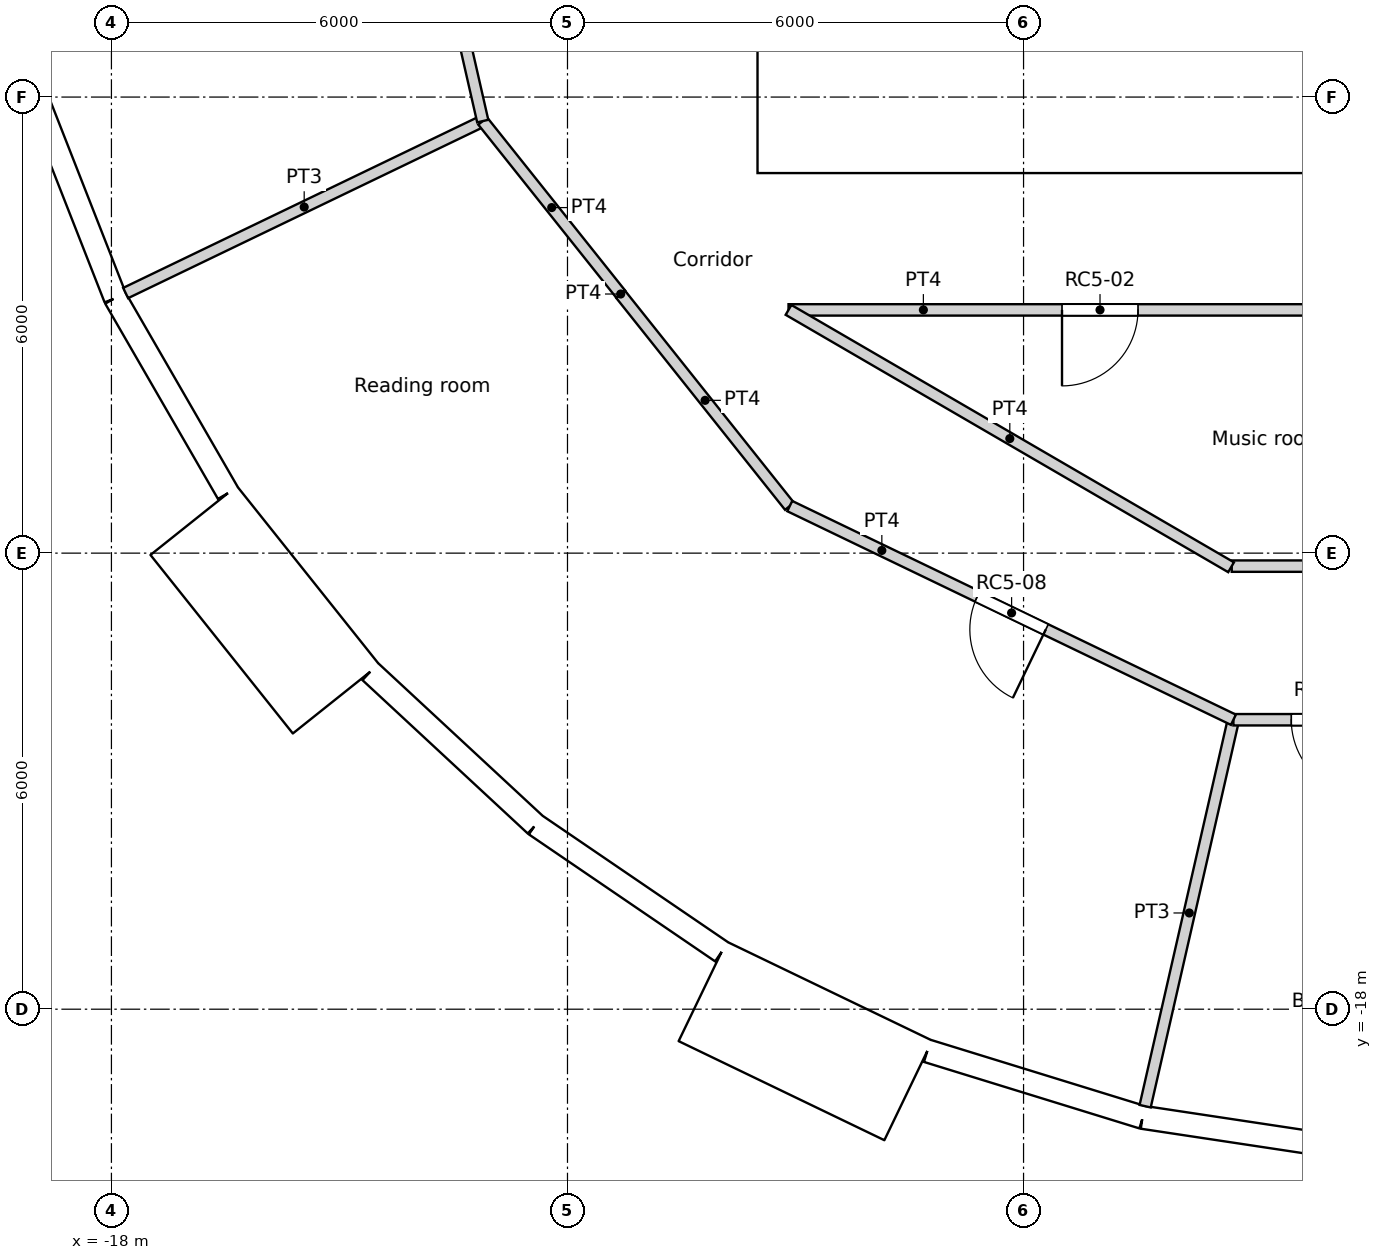
"""IFC4 building model, lengths in metres.
Left out: names, types, materials, properties, quantities, classifications, styles, units other than length and angle.
Written with IfcOpenShell. Run it as: python <this file> out.ifc"""

import sys

from ifc_helpers import new_model, si_unit, direction, frame, frame_2d, origin, origin_2d, place, context, subcontext, project, spatial, rectangle, circle, extrude, element, fill, save


model = new_model("IFC4")
c1 = context("Model", 3, precision=1e-05, world=origin(), true_north=direction((0.0, 1.0)))
c2 = subcontext(c1, "Body", "Model", "MODEL_VIEW")
j1 = project(units=[si_unit("LENGTHUNIT", "METRE"), si_unit("PLANEANGLEUNIT", "RADIAN")], contexts=[c1])
p1 = place(None, origin())
s1 = spatial("IfcSite", under=j1, at=p1, CompositionType="ELEMENT")
p2 = place(p1, origin())
s2 = spatial("IfcBuilding", under=s1, at=p2, CompositionType="ELEMENT")
p3 = place(p2, frame((0.0, 0.0, 270.6)))
s3 = spatial("IfcBuildingStorey", under=s2, at=p3, CompositionType="ELEMENT", Elevation=270.6)
for number, where, z_axis, x_axis in (
    (1, (-16.958, -8.167, 0.0), (0.0, 0.0, 1.0), (1.0, 0.0, 0.0)),
    (2, (-13.798, -12.802, 0.0), (0.0, 0.0, 1.0), (1.0, 0.0, 0.0)),
    (3, (-9.411, -16.301, 0.0), (0.0, 0.0, 1.0), (1.0, 0.0, 0.0)),
    (4, (-4.188, -18.35, 0.0), (0.0, 0.0, 1.0), (1.0, 0.0, 0.0)),
):
    element("IfcColumn", number, at=place(p3, frame(where, z_axis=z_axis, x_axis=x_axis)), inside=s3, PredefinedType="COLUMN", context=c2, shape_type="SweptSolid", body=[
        extrude(circle(Radius=0.55, at=origin_2d()), origin(), (0.0, 0.0, 1.0), 3.6),
    ])
p4 = place(p3, frame((-19.031, -5.886, 0.0), z_axis=(0.0, 0.0, 1.0), x_axis=(0.365343821297, -0.930872650925, 0.0)))
e5 = element("IfcWall", 5, at=p4, inside=s3, PredefinedType="SOLIDWALL", context=c2, shape_type="SweptSolid", body=[
    extrude(rectangle(XDim=2.962, YDim=0.3, at=frame_2d((1.481, 0.0))), origin(), (0.0, 0.0, 1.0), 3.25),
])
p5 = place(p4, frame((1.481, 0.0, 1.55)))
e6 = element("IfcOpeningElement", 6, at=p5, cuts=e5, PredefinedType="OPENING", context=c2, shape_type="SweptSolid", body=[
    extrude(circle(Radius=0.9, at=origin_2d()), frame((0.0, 0.16, 0.0), z_axis=(0.0, -1.0, 0.0), x_axis=(1.0, 0.0, 0.0)), (0.0, 0.0, 1.0), 0.32),
])
p6 = place(p3, frame((-17.949, -8.644, 0.0), z_axis=(0.0, 0.0, 1.0), x_axis=(0.500012570604, -0.866018146021, 0.0)))
e7 = element("IfcWall", 7, at=p6, inside=s3, PredefinedType="SOLIDWALL", context=c2, shape_type="SweptSolid", body=[
    extrude(rectangle(XDim=2.962, YDim=0.3, at=frame_2d((1.481, 0.0))), origin(), (0.0, 0.0, 1.0), 3.25),
])
p7 = place(p6, frame((1.481, 0.0, 1.55)))
e8 = element("IfcOpeningElement", 8, at=p7, cuts=e7, PredefinedType="OPENING", context=c2, shape_type="SweptSolid", body=[
    extrude(circle(Radius=0.9, at=origin_2d()), frame((0.0, 0.16, 0.0), z_axis=(0.0, -1.0, 0.0), x_axis=(1.0, 0.0, 0.0)), (0.0, 0.0, 1.0), 0.32),
])
p8 = place(p3, frame((-16.917, -11.572, -0.35), z_axis=(0.0, 0.0, 1.0), x_axis=(0.623523286312, -0.781804778335, 0.0)))
e9 = element("IfcWall", 9, at=p8, inside=s3, PredefinedType="ELEMENTEDWALL", context=c2, shape_type="SweptSolid", body=[
    extrude(rectangle(XDim=3.0, YDim=1.45, at=frame_2d((1.5, 0.0))), origin(), (0.0, 0.0, 1.0), 3.6),
])
p9 = place(p8, frame((1.5, 0.0, 1.9)))
e10 = element("IfcOpeningElement", 10, at=p9, cuts=e9, PredefinedType="OPENING", context=c2, shape_type="SweptSolid", body=[
    extrude(circle(Radius=0.9, at=origin_2d()), frame((0.0, 0.735, 0.0), z_axis=(0.0, -1.0, 0.0), x_axis=(1.0, 0.0, 0.0)), (0.0, 0.0, 1.0), 1.47),
])
p10 = place(p3, frame((-14.593, -13.561, 0.0), z_axis=(0.0, 0.0, 1.0), x_axis=(0.733028283666, -0.680198158882, 0.0)))
e11 = element("IfcWall", 11, at=p10, inside=s3, PredefinedType="SOLIDWALL", context=c2, shape_type="SweptSolid", body=[
    extrude(rectangle(XDim=2.962, YDim=0.3, at=frame_2d((1.481, 0.0))), origin(), (0.0, 0.0, 1.0), 3.25),
])
p11 = place(p10, frame((1.481, 0.0, 1.55)))
e12 = element("IfcOpeningElement", 12, at=p11, cuts=e11, PredefinedType="OPENING", context=c2, shape_type="SweptSolid", body=[
    extrude(circle(Radius=0.9, at=origin_2d()), frame((0.0, 0.16, 0.0), z_axis=(0.0, -1.0, 0.0), x_axis=(1.0, 0.0, 0.0)), (0.0, 0.0, 1.0), 0.32),
])
p12 = place(p3, frame((-12.421, -15.575, 0.0), z_axis=(0.0, 0.0, 1.0), x_axis=(0.826236061068, -0.563324037646, 0.0)))
e13 = element("IfcWall", 13, at=p12, inside=s3, PredefinedType="SOLIDWALL", context=c2, shape_type="SweptSolid", body=[
    extrude(rectangle(XDim=2.962, YDim=0.3, at=frame_2d((1.481, 0.0))), origin(), (0.0, 0.0, 1.0), 3.25),
])
p13 = place(p12, frame((1.481, 0.0, 1.55)))
e14 = element("IfcOpeningElement", 14, at=p13, cuts=e13, PredefinedType="OPENING", context=c2, shape_type="SweptSolid", body=[
    extrude(circle(Radius=0.9, at=origin_2d()), frame((0.0, 0.16, 0.0), z_axis=(0.0, -1.0, 0.0), x_axis=(1.0, 0.0, 0.0)), (0.0, 0.0, 1.0), 0.32),
])
p14 = place(p3, frame((-10.22, -17.766, -0.35), z_axis=(0.0, 0.0, 1.0), x_axis=(0.900953362039, -0.433915935904, 0.0)))
e15 = element("IfcWall", 15, at=p14, inside=s3, PredefinedType="ELEMENTEDWALL", context=c2, shape_type="SweptSolid", body=[
    extrude(rectangle(XDim=3.0, YDim=1.45, at=frame_2d((1.5, 0.0))), origin(), (0.0, 0.0, 1.0), 3.6),
])
p15 = place(p14, frame((1.5, 0.0, 1.9)))
e16 = element("IfcOpeningElement", 16, at=p15, cuts=e15, PredefinedType="OPENING", context=c2, shape_type="SweptSolid", body=[
    extrude(circle(Radius=0.9, at=origin_2d()), frame((0.0, 0.735, 0.0), z_axis=(0.0, -1.0, 0.0), x_axis=(1.0, 0.0, 0.0)), (0.0, 0.0, 1.0), 1.47),
])
p16 = place(p3, frame((-7.264, -18.549, 0.0), z_axis=(0.0, 0.0, 1.0), x_axis=(0.955555982805, -0.29480970765, 0.0)))
e17 = element("IfcWall", 17, at=p16, inside=s3, PredefinedType="SOLIDWALL", context=c2, shape_type="SweptSolid", body=[
    extrude(rectangle(XDim=2.962, YDim=0.3, at=frame_2d((1.481, 0.0))), origin(), (0.0, 0.0, 1.0), 3.25),
])
p17 = place(p16, frame((1.481, 0.0, 1.55)))
e18 = element("IfcOpeningElement", 18, at=p17, cuts=e17, PredefinedType="OPENING", context=c2, shape_type="SweptSolid", body=[
    extrude(circle(Radius=0.9, at=origin_2d()), frame((0.0, 0.16, 0.0), z_axis=(0.0, -1.0, 0.0), x_axis=(1.0, 0.0, 0.0)), (0.0, 0.0, 1.0), 0.32),
])
p18 = place(p3, frame((-4.433, -19.422, 0.0), z_axis=(0.0, 0.0, 1.0), x_axis=(0.988835775663, -0.149009425104, 0.0)))
e19 = element("IfcWall", 19, at=p18, inside=s3, PredefinedType="SOLIDWALL", context=c2, shape_type="SweptSolid", body=[
    extrude(rectangle(XDim=2.962, YDim=0.3, at=frame_2d((1.481, 0.0))), origin(), (0.0, 0.0, 1.0), 3.25),
])
p19 = place(p18, frame((1.481, 0.0, 1.55)))
e20 = element("IfcOpeningElement", 20, at=p19, cuts=e19, PredefinedType="OPENING", context=c2, shape_type="SweptSolid", body=[
    extrude(circle(Radius=0.9, at=origin_2d()), frame((0.0, 0.16, 0.0), z_axis=(0.0, -1.0, 0.0), x_axis=(1.0, 0.0, 0.0)), (0.0, 0.0, 1.0), 0.32),
])
p20 = place(p3, frame((-9.5, -6.7, 0.0), z_axis=(0.0, 0.0, 1.0), x_axis=(1.0, 0.0, 0.0)))
e21 = element("IfcWall", 21, at=p20, inside=s3, PredefinedType="SOLIDWALL", context=c2, shape_type="SweptSolid", body=[
    extrude(rectangle(XDim=19.0, YDim=0.6, at=frame_2d((9.5, 0.0))), origin(), (0.0, 0.0, 1.0), 3.6),
])
p21 = place(p20, frame((10.4, 0.0, 0.0)))
e22 = element("IfcOpeningElement", 22, at=p21, cuts=e21, PredefinedType="OPENING", context=c2, shape_type="SweptSolid", body=[
    extrude(rectangle(XDim=1.0, YDim=2.1, at=frame_2d((0.5, 1.05))), frame((0.0, 0.3, 0.0), z_axis=(0.0, -1.0, 0.0), x_axis=(1.0, 0.0, 0.0)), (0.0, 0.0, 1.0), 0.6),
])
p22 = place(p20, frame((5.35, 0.0, 0.0)))
e23 = element("IfcOpeningElement", 23, at=p22, cuts=e21, PredefinedType="OPENING", context=c2, shape_type="SweptSolid", body=[
    extrude(rectangle(XDim=1.7, YDim=2.1, at=frame_2d((0.85, 1.05))), frame((0.0, 0.3, 0.0), z_axis=(0.0, -1.0, 0.0), x_axis=(1.0, 0.0, 0.0)), (0.0, 0.0, 1.0), 0.6),
])
p23 = place(p20, frame((11.95, 0.0, 0.0)))
e24 = element("IfcOpeningElement", 24, at=p23, cuts=e21, PredefinedType="OPENING", context=c2, shape_type="SweptSolid", body=[
    extrude(rectangle(XDim=1.7, YDim=2.1, at=frame_2d((0.85, 1.05))), frame((0.0, 0.3, 0.0), z_axis=(0.0, -1.0, 0.0), x_axis=(1.0, 0.0, 0.0)), (0.0, 0.0, 1.0), 0.6),
])
p24 = place(p3, frame((-9.2, -6.4, 0.0), z_axis=(0.0, 0.0, 1.0), x_axis=(0.0, 1.0, 0.0)))
e25 = element("IfcWall", 25, at=p24, inside=s3, PredefinedType="SOLIDWALL", context=c2, shape_type="SweptSolid", body=[
    extrude(rectangle(XDim=12.8, YDim=0.6, at=frame_2d((6.4, 0.0))), origin(), (0.0, 0.0, 1.0), 3.6),
])
p25 = place(p3, frame((-2.25, -6.4, 0.0), z_axis=(0.0, 0.0, 1.0), x_axis=(0.0, 1.0, 0.0)))
e26 = element("IfcWall", 26, at=p25, inside=s3, PredefinedType="SOLIDWALL", context=c2, shape_type="SweptSolid", body=[
    extrude(rectangle(XDim=3.15, YDim=0.3, at=frame_2d((1.575, 0.0))), origin(), (0.0, 0.0, 1.0), 3.25),
])
p26 = place(p3, frame((-9.092, -8.8, 0.0), z_axis=(0.0, 0.0, 1.0), x_axis=(1.0, 0.0, 0.0)))
e27 = element("IfcWall", 27, at=p26, inside=s3, PredefinedType="PARTITIONING", context=c2, shape_type="SweptSolid", body=[
    extrude(rectangle(XDim=8.196, YDim=0.15, at=frame_2d((4.098, 0.0))), origin(), (0.0, 0.0, 1.0), 3.1),
])
p27 = place(p26, frame((3.598, 0.0, 0.0)))
e28 = element("IfcOpeningElement", 28, at=p27, cuts=e27, PredefinedType="OPENING", context=c2, shape_type="SweptSolid", body=[
    extrude(rectangle(XDim=1.0, YDim=2.04, at=frame_2d((0.5, 1.02))), frame((0.0, 0.075, 0.0), z_axis=(0.0, -1.0, 0.0), x_axis=(1.0, 0.0, 0.0)), (0.0, 0.0, 1.0), 0.15),
])
p28 = place(p3, frame((-9.092, -8.8, 0.0), z_axis=(0.0, 0.0, 1.0), x_axis=(0.864470922103, -0.502682827277, 0.0)))
e29 = element("IfcWall", 29, at=p28, inside=s3, PredefinedType="PARTITIONING", context=c2, shape_type="SweptSolid", body=[
    extrude(rectangle(XDim=6.735, YDim=0.15, at=frame_2d((3.368, 0.0))), origin(), (0.0, 0.0, 1.0), 3.1),
])
p29 = place(p3, frame((-11.3, -8.596, 0.0), z_axis=(0.0, 0.0, 1.0), x_axis=(0.623165080354, -0.782090328944, 0.0)))
e30 = element("IfcWall", 30, at=p29, inside=s3, PredefinedType="PARTITIONING", context=c2, shape_type="SweptSolid", body=[
    extrude(rectangle(XDim=3.564, YDim=0.15, at=frame_2d((1.782, 0.0))), origin(), (0.0, 0.0, 1.0), 3.1),
])
p30 = place(p3, frame((-11.3, -8.596, 0.0), z_axis=(0.0, 0.0, 1.0), x_axis=(0.0, 1.0, 0.0)))
e31 = element("IfcWall", 31, at=p30, inside=s3, PredefinedType="PARTITIONING", context=c2, shape_type="SweptSolid", body=[
    extrude(rectangle(XDim=0.01, YDim=0.15, at=frame_2d((0.005, 0.0))), origin(), (0.0, 0.0, 1.0), 3.1),
])
p31 = place(p3, frame((-14.557, 0.0, 0.0), z_axis=(0.0, 0.0, 1.0), x_axis=(0.222568978642, -0.97491694505, 0.0)))
e32 = element("IfcWall", 32, at=p31, inside=s3, PredefinedType="PARTITIONING", context=c2, shape_type="SweptSolid", body=[
    extrude(rectangle(XDim=6.479, YDim=0.15, at=frame_2d((3.239, 0.0))), origin(), (0.0, 0.0, 1.0), 3.1),
])
p32 = place(p31, frame((2.34, 0.0, 0.0)))
e33 = element("IfcOpeningElement", 33, at=p32, cuts=e32, PredefinedType="OPENING", context=c2, shape_type="SweptSolid", body=[
    extrude(rectangle(XDim=1.8, YDim=2.1, at=frame_2d((0.9, 1.05))), frame((0.0, 0.075, 0.0), z_axis=(0.0, -1.0, 0.0), x_axis=(1.0, 0.0, 0.0)), (0.0, 0.0, 1.0), 0.15),
])
p33 = place(p3, frame((-13.115, -6.316, 0.0), z_axis=(0.0, 0.0, 1.0), x_axis=(0.623446514299, -0.781866001185, 0.0)))
e34 = element("IfcWall", 34, at=p33, inside=s3, PredefinedType="PARTITIONING", context=c2, shape_type="SweptSolid", body=[
    extrude(rectangle(XDim=2.911, YDim=0.15, at=frame_2d((1.456, 0.0))), origin(), (0.0, 0.0, 1.0), 3.1),
])
p34 = place(p3, frame((-3.261, -12.171, 0.0), z_axis=(0.0, 0.0, 1.0), x_axis=(1.0, 0.0, 0.0)))
e35 = element("IfcWall", 35, at=p34, inside=s3, PredefinedType="PARTITIONING", context=c2, shape_type="SweptSolid", body=[
    extrude(rectangle(XDim=2.361, YDim=0.15, at=frame_2d((1.181, 0.0))), origin(), (0.0, 0.0, 1.0), 3.1),
])
p35 = place(p3, frame((-9.076, -11.381, 0.0), z_axis=(0.0, 0.0, 1.0), x_axis=(0.900976027191, -0.433868872388, 0.0)))
e36 = element("IfcWall", 36, at=p35, inside=s3, PredefinedType="PARTITIONING", context=c2, shape_type="SweptSolid", body=[
    extrude(rectangle(XDim=6.479, YDim=0.15, at=frame_2d((3.239, 0.0))), origin(), (0.0, 0.0, 1.0), 3.1),
])
p36 = place(p35, frame((2.74, 0.0, 0.0)))
e37 = element("IfcOpeningElement", 37, at=p36, cuts=e36, PredefinedType="OPENING", context=c2, shape_type="SweptSolid", body=[
    extrude(rectangle(XDim=1.0, YDim=2.04, at=frame_2d((0.5, 1.02))), frame((0.0, 0.075, 0.0), z_axis=(0.0, -1.0, 0.0), x_axis=(1.0, 0.0, 0.0)), (0.0, 0.0, 1.0), 0.15),
])
p37 = place(p3, frame((-3.239, -14.192, 0.0), z_axis=(0.0, 0.0, 1.0), x_axis=(1.0, 0.0, 0.0)))
e38 = element("IfcWall", 38, at=p37, inside=s3, PredefinedType="PARTITIONING", context=c2, shape_type="SweptSolid", body=[
    extrude(rectangle(XDim=6.478, YDim=0.15, at=frame_2d((3.239, 0.0))), origin(), (0.0, 0.0, 1.0), 3.1),
])
p38 = place(p37, frame((0.761, 0.0, 0.0)))
e39 = element("IfcOpeningElement", 39, at=p38, cuts=e38, PredefinedType="OPENING", context=c2, shape_type="SweptSolid", body=[
    extrude(rectangle(XDim=1.0, YDim=2.1, at=frame_2d((0.5, 1.05))), frame((0.0, 0.075, 0.0), z_axis=(0.0, -1.0, 0.0), x_axis=(1.0, 0.0, 0.0)), (0.0, 0.0, 1.0), 0.15),
])
p39 = place(p3, frame((-17.813, -8.578, 0.0), z_axis=(0.0, 0.0, 1.0), x_axis=(0.901004381064, 0.433809987557, 0.0)))
e40 = element("IfcWall", 40, at=p39, inside=s3, PredefinedType="PARTITIONING", context=c2, shape_type="SweptSolid", body=[
    extrude(rectangle(XDim=5.214, YDim=0.15, at=frame_2d((2.607, 0.0))), origin(), (0.0, 0.0, 1.0), 3.1),
])
p40 = place(p3, frame((-4.4, -19.276, 0.0), z_axis=(0.0, 0.0, 1.0), x_axis=(0.222612505682, 0.974907007008, 0.0)))
e41 = element("IfcWall", 41, at=p40, inside=s3, PredefinedType="PARTITIONING", context=c2, shape_type="SweptSolid", body=[
    extrude(rectangle(XDim=5.215, YDim=0.15, at=frame_2d((2.607, 0.0))), origin(), (0.0, 0.0, 1.0), 3.1),
])
p41 = place(p5, origin())
e42 = element("IfcWindow", 42, at=p41, inside=s3, PartitioningType="SINGLE_PANEL", PredefinedType="WINDOW", context=c2, shape_type="SweptSolid", body=[
    extrude(circle(Radius=0.9, at=origin_2d()), frame((0.0, 0.12, 0.0), z_axis=(0.0, -1.0, 0.0), x_axis=(1.0, 0.0, 0.0)), (0.0, 0.0, 1.0), 0.1),
])
fill(e6, e42)
p42 = place(p7, origin())
e43 = element("IfcWindow", 43, at=p42, inside=s3, PartitioningType="SINGLE_PANEL", PredefinedType="WINDOW", context=c2, shape_type="SweptSolid", body=[
    extrude(circle(Radius=0.9, at=origin_2d()), frame((0.0, 0.12, 0.0), z_axis=(0.0, -1.0, 0.0), x_axis=(1.0, 0.0, 0.0)), (0.0, 0.0, 1.0), 0.1),
])
fill(e8, e43)
p43 = place(p9, origin())
e44 = element("IfcWindow", 44, at=p43, inside=s3, PartitioningType="SINGLE_PANEL", PredefinedType="WINDOW", context=c2, shape_type="SweptSolid", body=[
    extrude(circle(Radius=0.9, at=origin_2d()), frame((0.0, 0.695, 0.0), z_axis=(0.0, -1.0, 0.0), x_axis=(1.0, 0.0, 0.0)), (0.0, 0.0, 1.0), 0.1),
])
fill(e10, e44)
p44 = place(p11, origin())
e45 = element("IfcWindow", 45, at=p44, inside=s3, PartitioningType="SINGLE_PANEL", PredefinedType="WINDOW", context=c2, shape_type="SweptSolid", body=[
    extrude(circle(Radius=0.9, at=origin_2d()), frame((0.0, 0.12, 0.0), z_axis=(0.0, -1.0, 0.0), x_axis=(1.0, 0.0, 0.0)), (0.0, 0.0, 1.0), 0.1),
])
fill(e12, e45)
p45 = place(p13, origin())
e46 = element("IfcWindow", 46, at=p45, inside=s3, PartitioningType="SINGLE_PANEL", PredefinedType="WINDOW", context=c2, shape_type="SweptSolid", body=[
    extrude(circle(Radius=0.9, at=origin_2d()), frame((0.0, 0.12, 0.0), z_axis=(0.0, -1.0, 0.0), x_axis=(1.0, 0.0, 0.0)), (0.0, 0.0, 1.0), 0.1),
])
fill(e14, e46)
p46 = place(p15, origin())
e47 = element("IfcWindow", 47, at=p46, inside=s3, PartitioningType="SINGLE_PANEL", PredefinedType="WINDOW", context=c2, shape_type="SweptSolid", body=[
    extrude(circle(Radius=0.9, at=origin_2d()), frame((0.0, 0.695, 0.0), z_axis=(0.0, -1.0, 0.0), x_axis=(1.0, 0.0, 0.0)), (0.0, 0.0, 1.0), 0.1),
])
fill(e16, e47)
p47 = place(p17, origin())
e48 = element("IfcWindow", 48, at=p47, inside=s3, PartitioningType="SINGLE_PANEL", PredefinedType="WINDOW", context=c2, shape_type="SweptSolid", body=[
    extrude(circle(Radius=0.9, at=origin_2d()), frame((0.0, 0.12, 0.0), z_axis=(0.0, -1.0, 0.0), x_axis=(1.0, 0.0, 0.0)), (0.0, 0.0, 1.0), 0.1),
])
fill(e18, e48)
p48 = place(p19, origin())
e49 = element("IfcWindow", 49, at=p48, inside=s3, PartitioningType="SINGLE_PANEL", PredefinedType="WINDOW", context=c2, shape_type="SweptSolid", body=[
    extrude(circle(Radius=0.9, at=origin_2d()), frame((0.0, 0.12, 0.0), z_axis=(0.0, -1.0, 0.0), x_axis=(1.0, 0.0, 0.0)), (0.0, 0.0, 1.0), 0.1),
])
fill(e20, e49)
p49 = place(p22, origin())
e50 = element("IfcDoor", 50, at=p49, inside=s3, OperationType="DOUBLE_DOOR_SINGLE_SWING", PredefinedType="DOOR", context=c2, shape_type="SweptSolid", body=[
    extrude(rectangle(XDim=1.7, YDim=2.1, at=frame_2d((0.85, 1.05))), frame((0.0, 0.025, 0.0), z_axis=(0.0, -1.0, 0.0), x_axis=(1.0, 0.0, 0.0)), (0.0, 0.0, 1.0), 0.05),
])
fill(e23, e50)
p50 = place(p27, origin())
e51 = element("IfcDoor", 51, at=p50, inside=s3, OperationType="SINGLE_SWING_RIGHT", PredefinedType="DOOR", context=c2, shape_type="SweptSolid", body=[
    extrude(rectangle(XDim=1.0, YDim=2.04, at=frame_2d((0.5, 1.02))), frame((0.0, 0.025, 0.0), z_axis=(0.0, -1.0, 0.0), x_axis=(1.0, 0.0, 0.0)), (0.0, 0.0, 1.0), 0.05),
])
fill(e28, e51)
p51 = place(p36, origin())
e52 = element("IfcDoor", 52, at=p51, inside=s3, OperationType="SINGLE_SWING_LEFT", PredefinedType="DOOR", context=c2, shape_type="SweptSolid", body=[
    extrude(rectangle(XDim=1.0, YDim=2.04, at=frame_2d((0.5, 1.02))), frame((0.0, 0.025, 0.0), z_axis=(0.0, -1.0, 0.0), x_axis=(1.0, 0.0, 0.0)), (0.0, 0.0, 1.0), 0.05),
])
fill(e37, e52)
p52 = place(p38, origin())
e53 = element("IfcDoor", 53, at=p52, inside=s3, OperationType="SINGLE_SWING_LEFT", PredefinedType="DOOR", context=c2, shape_type="SweptSolid", body=[
    extrude(rectangle(XDim=1.0, YDim=2.1, at=frame_2d((0.5, 1.05))), frame((0.0, 0.025, 0.0), z_axis=(0.0, -1.0, 0.0), x_axis=(1.0, 0.0, 0.0)), (0.0, 0.0, 1.0), 0.05),
])
fill(e39, e53)
save(model, sys.argv[1])
